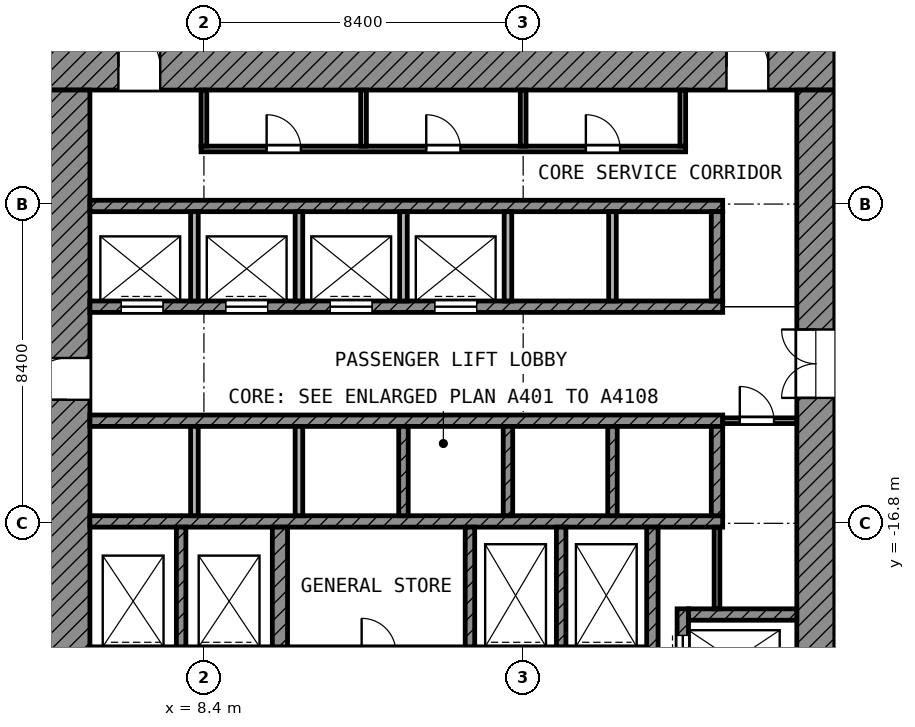
"""IFC4 building model, lengths in metres.
Left out: names, types, materials, properties, quantities, classifications, styles, units other than length and angle.
Written with IfcOpenShell. Run it as: python <this file> out.ifc"""

import sys

from ifc_helpers import new_model, si_unit, direction, frame, frame_2d, origin, place, context, subcontext, project, spatial, rectangle, extrude, element, fill, save


model = new_model("IFC4")
c1 = context("Model", 3, precision=1e-05, world=origin(), true_north=direction((0.0, 1.0)))
c2 = subcontext(c1, "Body", "Model", "MODEL_VIEW")
j1 = project(units=[si_unit("LENGTHUNIT", "METRE"), si_unit("PLANEANGLEUNIT", "RADIAN")], contexts=[c1])
p1 = place(None, origin())
s1 = spatial("IfcSite", under=j1, at=p1, CompositionType="ELEMENT")
p2 = place(p1, origin())
s2 = spatial("IfcBuilding", under=s1, at=p2, CompositionType="ELEMENT")
p3 = place(p2, frame((0.0, 0.0, 124.0)))
s3 = spatial("IfcBuildingStorey", under=s2, at=p3, CompositionType="ELEMENT", Elevation=124.0)
p4 = place(p3, frame((4.2, -4.8, 0.0), z_axis=(0.0, 0.0, 1.0), x_axis=(1.0, 0.0, 0.0)))
e1 = element("IfcWall", 1, at=p4, inside=s3, PredefinedType="SHEAR", context=c2, shape_type="SweptSolid", body=[
    extrude(rectangle(XDim=20.8, YDim=1.2, at=frame_2d((10.4, 0.0))), origin(), (0.0, 0.0, 1.0), 3.6),
])
p5 = place(p4, frame((1.95, 0.0, 0.0)))
e2 = element("IfcOpeningElement", 2, at=p5, cuts=e1, PredefinedType="OPENING", context=c2, shape_type="SweptSolid", body=[
    extrude(rectangle(XDim=1.1, YDim=2.1, at=frame_2d((0.55, 1.05))), frame((0.0, 0.61, 0.0), z_axis=(0.0, -1.0, 0.0), x_axis=(1.0, 0.0, 0.0)), (0.0, 0.0, 1.0), 1.22),
])
p6 = place(p4, frame((17.95, 0.0, 0.0)))
e3 = element("IfcOpeningElement", 3, at=p6, cuts=e1, PredefinedType="OPENING", context=c2, shape_type="SweptSolid", body=[
    extrude(rectangle(XDim=1.1, YDim=2.1, at=frame_2d((0.55, 1.05))), frame((0.0, 0.61, 0.0), z_axis=(0.0, -1.0, 0.0), x_axis=(1.0, 0.0, 0.0)), (0.0, 0.0, 1.0), 1.22),
])
p7 = place(p3, frame((4.8, -25.0, 0.0), z_axis=(0.0, 0.0, 1.0), x_axis=(0.0, 1.0, 0.0)))
e4 = element("IfcWall", 4, at=p7, inside=s3, PredefinedType="SHEAR", context=c2, shape_type="SweptSolid", body=[
    extrude(rectangle(XDim=19.6, YDim=1.2, at=frame_2d((9.8, 0.0))), origin(), (0.0, 0.0, 1.0), 3.6),
])
p8 = place(p7, frame((11.45, 0.0, 0.0)))
e5 = element("IfcOpeningElement", 5, at=p8, cuts=e4, PredefinedType="OPENING", context=c2, shape_type="SweptSolid", body=[
    extrude(rectangle(XDim=1.1, YDim=2.1, at=frame_2d((0.55, 1.05))), frame((0.0, 0.61, 0.0), z_axis=(0.0, -1.0, 0.0), x_axis=(1.0, 0.0, 0.0)), (0.0, 0.0, 1.0), 1.22),
])
p9 = place(p7, frame((2.15, 0.0, 0.0)))
e6 = element("IfcOpeningElement", 6, at=p9, cuts=e4, PredefinedType="OPENING", context=c2, shape_type="SweptSolid", body=[
    extrude(rectangle(XDim=1.1, YDim=2.1, at=frame_2d((0.55, 1.05))), frame((0.0, 0.61, 0.0), z_axis=(0.0, -1.0, 0.0), x_axis=(1.0, 0.0, 0.0)), (0.0, 0.0, 1.0), 1.22),
])
p10 = place(p3, frame((24.5, -24.0, 0.0), z_axis=(0.0, 0.0, 1.0), x_axis=(0.0, 1.0, 0.0)))
e7 = element("IfcWall", 7, at=p10, inside=s3, PredefinedType="SHEAR", context=c2, shape_type="SweptSolid", body=[
    extrude(rectangle(XDim=18.6, YDim=1.0, at=frame_2d((9.3, 0.0))), origin(), (0.0, 0.0, 1.0), 3.6),
])
p11 = place(p10, frame((10.5, 0.0, 0.0)))
e8 = element("IfcOpeningElement", 8, at=p11, cuts=e7, PredefinedType="OPENING", context=c2, shape_type="SweptSolid", body=[
    extrude(rectangle(XDim=1.8, YDim=2.1, at=frame_2d((0.9, 1.05))), frame((0.0, 0.51, 0.0), z_axis=(0.0, -1.0, 0.0), x_axis=(1.0, 0.0, 0.0)), (0.0, 0.0, 1.0), 1.02),
])
p12 = place(p3, frame((5.4, -8.45, 0.0), z_axis=(0.0, 0.0, 1.0), x_axis=(1.0, 0.0, 0.0)))
e9 = element("IfcWall", 9, at=p12, inside=s3, PredefinedType="SHEAR", context=c2, shape_type="SweptSolid", body=[
    extrude(rectangle(XDim=16.65, YDim=0.3, at=frame_2d((8.325, 0.0))), origin(), (0.0, 0.0, 1.0), 3.6),
])
p13 = place(p3, frame((5.4, -11.1, 0.0), z_axis=(0.0, 0.0, 1.0), x_axis=(1.0, 0.0, 0.0)))
e10 = element("IfcWall", 10, at=p13, inside=s3, PredefinedType="SHEAR", context=c2, shape_type="SweptSolid", body=[
    extrude(rectangle(XDim=16.65, YDim=0.3, at=frame_2d((8.325, 0.0))), origin(), (0.0, 0.0, 1.0), 3.6),
])
p14 = place(p13, frame((0.825, 0.0, 0.0)))
e11 = element("IfcOpeningElement", 11, at=p14, cuts=e10, PredefinedType="OPENING", context=c2, shape_type="SweptSolid", body=[
    extrude(rectangle(XDim=1.1, YDim=2.1, at=frame_2d((0.55, 1.05))), frame((0.0, 0.16, 0.0), z_axis=(0.0, -1.0, 0.0), x_axis=(1.0, 0.0, 0.0)), (0.0, 0.0, 1.0), 0.32),
])
p15 = place(p13, frame((3.575, 0.0, 0.0)))
e12 = element("IfcOpeningElement", 12, at=p15, cuts=e10, PredefinedType="OPENING", context=c2, shape_type="SweptSolid", body=[
    extrude(rectangle(XDim=1.1, YDim=2.1, at=frame_2d((0.55, 1.05))), frame((0.0, 0.16, 0.0), z_axis=(0.0, -1.0, 0.0), x_axis=(1.0, 0.0, 0.0)), (0.0, 0.0, 1.0), 0.32),
])
p16 = place(p13, frame((6.325, 0.0, 0.0)))
e13 = element("IfcOpeningElement", 13, at=p16, cuts=e10, PredefinedType="OPENING", context=c2, shape_type="SweptSolid", body=[
    extrude(rectangle(XDim=1.1, YDim=2.1, at=frame_2d((0.55, 1.05))), frame((0.0, 0.16, 0.0), z_axis=(0.0, -1.0, 0.0), x_axis=(1.0, 0.0, 0.0)), (0.0, 0.0, 1.0), 0.32),
])
p17 = place(p13, frame((9.075, 0.0, 0.0)))
e14 = element("IfcOpeningElement", 14, at=p17, cuts=e10, PredefinedType="OPENING", context=c2, shape_type="SweptSolid", body=[
    extrude(rectangle(XDim=1.1, YDim=2.1, at=frame_2d((0.55, 1.05))), frame((0.0, 0.16, 0.0), z_axis=(0.0, -1.0, 0.0), x_axis=(1.0, 0.0, 0.0)), (0.0, 0.0, 1.0), 0.32),
])
for number, where, z_axis, x_axis in (
    (15, (5.4, -14.1, 0.0), (0.0, 0.0, 1.0), (1.0, 0.0, 0.0)),
    (16, (5.4, -16.75, 0.0), (0.0, 0.0, 1.0), (1.0, 0.0, 0.0)),
):
    element("IfcWall", number, at=place(p3, frame(where, z_axis=z_axis, x_axis=x_axis)), inside=s3, PredefinedType="SHEAR", context=c2, shape_type="SweptSolid", body=[
        extrude(rectangle(XDim=16.65, YDim=0.3, at=frame_2d((8.325, 0.0))), origin(), (0.0, 0.0, 1.0), 3.6),
    ])
p18 = place(p3, frame((5.4, -20.2, 0.0), z_axis=(0.0, 0.0, 1.0), x_axis=(1.0, 0.0, 0.0)))
e17 = element("IfcWall", 17, at=p18, inside=s3, PredefinedType="SHEAR", context=c2, shape_type="SweptSolid", body=[
    extrude(rectangle(XDim=14.65, YDim=0.3, at=frame_2d((7.325, 0.0))), origin(), (0.0, 0.0, 1.0), 3.6),
])
p19 = place(p18, frame((10.55, 0.0, 0.0)))
e18 = element("IfcOpeningElement", 18, at=p19, cuts=e17, PredefinedType="OPENING", context=c2, shape_type="SweptSolid", body=[
    extrude(rectangle(XDim=1.3, YDim=2.1, at=frame_2d((0.65, 1.05))), frame((0.0, 0.16, 0.0), z_axis=(0.0, -1.0, 0.0), x_axis=(1.0, 0.0, 0.0)), (0.0, 0.0, 1.0), 0.32),
])
p20 = place(p18, frame((12.95, 0.0, 0.0)))
e19 = element("IfcOpeningElement", 19, at=p20, cuts=e17, PredefinedType="OPENING", context=c2, shape_type="SweptSolid", body=[
    extrude(rectangle(XDim=1.3, YDim=2.1, at=frame_2d((0.65, 1.05))), frame((0.0, 0.16, 0.0), z_axis=(0.0, -1.0, 0.0), x_axis=(1.0, 0.0, 0.0)), (0.0, 0.0, 1.0), 0.32),
])
p21 = place(p18, frame((0.55, 0.0, 0.0)))
e20 = element("IfcOpeningElement", 20, at=p21, cuts=e17, PredefinedType="OPENING", context=c2, shape_type="SweptSolid", body=[
    extrude(rectangle(XDim=1.3, YDim=2.1, at=frame_2d((0.65, 1.05))), frame((0.0, 0.16, 0.0), z_axis=(0.0, -1.0, 0.0), x_axis=(1.0, 0.0, 0.0)), (0.0, 0.0, 1.0), 0.32),
])
p22 = place(p18, frame((2.95, 0.0, 0.0)))
e21 = element("IfcOpeningElement", 21, at=p22, cuts=e17, PredefinedType="OPENING", context=c2, shape_type="SweptSolid", body=[
    extrude(rectangle(XDim=1.3, YDim=2.1, at=frame_2d((0.65, 1.05))), frame((0.0, 0.16, 0.0), z_axis=(0.0, -1.0, 0.0), x_axis=(1.0, 0.0, 0.0)), (0.0, 0.0, 1.0), 0.32),
])
p23 = place(p18, frame((7.15, 0.0, 0.0)))
e22 = element("IfcOpeningElement", 22, at=p23, cuts=e17, PredefinedType="OPENING", context=c2, shape_type="SweptSolid", body=[
    extrude(rectangle(XDim=0.9, YDim=2.1, at=frame_2d((0.45, 1.05))), frame((0.0, 0.16, 0.0), z_axis=(0.0, -1.0, 0.0), x_axis=(1.0, 0.0, 0.0)), (0.0, 0.0, 1.0), 0.32),
])
p24 = place(p3, frame((10.4, -20.05, 0.0), z_axis=(0.0, 0.0, 1.0), x_axis=(0.0, 1.0, 0.0)))
e23 = element("IfcWall", 23, at=p24, inside=s3, PredefinedType="SHEAR", context=c2, shape_type="SweptSolid", body=[
    extrude(rectangle(XDim=3.15, YDim=0.4, at=frame_2d((1.575, 0.0))), origin(), (0.0, 0.0, 1.0), 3.6),
])
p25 = place(p3, frame((20.2, -20.35, 0.0), z_axis=(0.0, 0.0, 1.0), x_axis=(0.0, 1.0, 0.0)))
e24 = element("IfcWall", 24, at=p25, inside=s3, PredefinedType="SHEAR", context=c2, shape_type="SweptSolid", body=[
    extrude(rectangle(XDim=3.45, YDim=0.3, at=frame_2d((1.725, 0.0))), origin(), (0.0, 0.0, 1.0), 3.6),
])
p26 = place(p3, frame((21.9, -10.95, 0.0), z_axis=(0.0, 0.0, 1.0), x_axis=(0.0, 1.0, 0.0)))
e25 = element("IfcWall", 25, at=p26, inside=s3, PredefinedType="SHEAR", context=c2, shape_type="SweptSolid", body=[
    extrude(rectangle(XDim=2.35, YDim=0.3, at=frame_2d((1.175, 0.0))), origin(), (0.0, 0.0, 1.0), 3.6),
])
p27 = place(p3, frame((21.9, -16.6, 0.0), z_axis=(0.0, 0.0, 1.0), x_axis=(0.0, 1.0, 0.0)))
e26 = element("IfcWall", 26, at=p27, inside=s3, PredefinedType="SHEAR", context=c2, shape_type="SweptSolid", body=[
    extrude(rectangle(XDim=2.35, YDim=0.3, at=frame_2d((1.175, 0.0))), origin(), (0.0, 0.0, 1.0), 3.6),
])
p28 = place(p3, frame((21.15, -19.2, 0.0), z_axis=(0.0, 0.0, 1.0), x_axis=(1.0, 0.0, 0.0)))
e27 = element("IfcWall", 27, at=p28, inside=s3, PredefinedType="SHEAR", context=c2, shape_type="SweptSolid", body=[
    extrude(rectangle(XDim=2.85, YDim=0.3, at=frame_2d((1.425, 0.0))), origin(), (0.0, 0.0, 1.0), 3.6),
])
p29 = place(p3, frame((21.0, -24.0, 0.0), z_axis=(0.0, 0.0, 1.0), x_axis=(0.0, 1.0, 0.0)))
e28 = element("IfcWall", 28, at=p29, inside=s3, PredefinedType="SHEAR", context=c2, shape_type="SweptSolid", body=[
    extrude(rectangle(XDim=4.95, YDim=0.3, at=frame_2d((2.475, 0.0))), origin(), (0.0, 0.0, 1.0), 3.6),
])
p30 = place(p29, frame((2.95, 0.0, 0.0)))
e29 = element("IfcOpeningElement", 29, at=p30, cuts=e28, PredefinedType="OPENING", context=c2, shape_type="SweptSolid", body=[
    extrude(rectangle(XDim=1.3, YDim=2.1, at=frame_2d((0.65, 1.05))), frame((0.0, 0.16, 0.0), z_axis=(0.0, -1.0, 0.0), x_axis=(1.0, 0.0, 0.0)), (0.0, 0.0, 1.0), 0.32),
])
p31 = place(p29, frame((0.55, 0.0, 0.0)))
e30 = element("IfcOpeningElement", 30, at=p31, cuts=e28, PredefinedType="OPENING", context=c2, shape_type="SweptSolid", body=[
    extrude(rectangle(XDim=1.3, YDim=2.1, at=frame_2d((0.65, 1.05))), frame((0.0, 0.16, 0.0), z_axis=(0.0, -1.0, 0.0), x_axis=(1.0, 0.0, 0.0)), (0.0, 0.0, 1.0), 0.32),
])
for number, where, z_axis, x_axis in (
    (31, (7.8, -20.05, 0.0), (0.0, 0.0, 1.0), (0.0, 1.0, 0.0)),
    (32, (15.4, -20.05, 0.0), (0.0, 0.0, 1.0), (0.0, 1.0, 0.0)),
    (33, (17.8, -20.05, 0.0), (0.0, 0.0, 1.0), (0.0, 1.0, 0.0)),
):
    element("IfcWall", number, at=place(p3, frame(where, z_axis=z_axis, x_axis=x_axis)), inside=s3, PredefinedType="SHEAR", context=c2, shape_type="SweptSolid", body=[
        extrude(rectangle(XDim=3.15, YDim=0.25, at=frame_2d((1.575, 0.0))), origin(), (0.0, 0.0, 1.0), 3.6),
    ])
for number, where, z_axis, x_axis in (
    (34, (8.15, -10.95, 0.0), (0.0, 0.0, 1.0), (0.0, 1.0, 0.0)),
    (35, (10.9, -10.95, 0.0), (0.0, 0.0, 1.0), (0.0, 1.0, 0.0)),
    (36, (13.65, -10.95, 0.0), (0.0, 0.0, 1.0), (0.0, 1.0, 0.0)),
    (37, (16.4, -10.95, 0.0), (0.0, 0.0, 1.0), (0.0, 1.0, 0.0)),
    (38, (19.15, -10.95, 0.0), (0.0, 0.0, 1.0), (0.0, 1.0, 0.0)),
):
    element("IfcWall", number, at=place(p3, frame(where, z_axis=z_axis, x_axis=x_axis)), inside=s3, PredefinedType="PARTITIONING", context=c2, shape_type="SweptSolid", body=[
        extrude(rectangle(XDim=2.35, YDim=0.2, at=frame_2d((1.175, 0.0))), origin(), (0.0, 0.0, 1.0), 3.6),
    ])
for number, where, z_axis, x_axis in (
    (39, (8.15, -16.6, 0.0), (0.0, 0.0, 1.0), (0.0, 1.0, 0.0)),
    (40, (10.9, -16.6, 0.0), (0.0, 0.0, 1.0), (0.0, 1.0, 0.0)),
):
    element("IfcWall", number, at=place(p3, frame(where, z_axis=z_axis, x_axis=x_axis)), inside=s3, PredefinedType="PARTITIONING", context=c2, shape_type="SweptSolid", body=[
        extrude(rectangle(XDim=2.35, YDim=0.2, at=frame_2d((1.175, 0.0))), origin(), (0.0, 0.0, 1.0), 3.6),
    ])
for number, where, z_axis, x_axis in (
    (41, (13.65, -16.6, 0.0), (0.0, 0.0, 1.0), (0.0, 1.0, 0.0)),
    (42, (16.4, -16.6, 0.0), (0.0, 0.0, 1.0), (0.0, 1.0, 0.0)),
    (43, (19.15, -16.6, 0.0), (0.0, 0.0, 1.0), (0.0, 1.0, 0.0)),
):
    element("IfcWall", number, at=place(p3, frame(where, z_axis=z_axis, x_axis=x_axis)), inside=s3, PredefinedType="SHEAR", context=c2, shape_type="SweptSolid", body=[
        extrude(rectangle(XDim=2.35, YDim=0.25, at=frame_2d((1.175, 0.0))), origin(), (0.0, 0.0, 1.0), 3.6),
    ])
p32 = place(p3, frame((21.9, -19.05, 0.0), z_axis=(0.0, 0.0, 1.0), x_axis=(0.0, 1.0, 0.0)))
e44 = element("IfcWall", 44, at=p32, inside=s3, PredefinedType="PARTITIONING", context=c2, shape_type="SweptSolid", body=[
    extrude(rectangle(XDim=2.15, YDim=0.15, at=frame_2d((1.075, 0.0))), origin(), (0.0, 0.0, 1.0), 3.6),
])
p33 = place(p3, frame((22.05, -14.1, 0.0), z_axis=(0.0, 0.0, 1.0), x_axis=(1.0, 0.0, 0.0)))
e45 = element("IfcWall", 45, at=p33, inside=s3, PredefinedType="PARTITIONING", context=c2, shape_type="SweptSolid", body=[
    extrude(rectangle(XDim=1.95, YDim=0.15, at=frame_2d((0.975, 0.0))), origin(), (0.0, 0.0, 1.0), 3.6),
])
p34 = place(p33, frame((0.45, 0.0, 0.0)))
e46 = element("IfcOpeningElement", 46, at=p34, cuts=e45, PredefinedType="OPENING", context=c2, shape_type="SweptSolid", body=[
    extrude(rectangle(XDim=0.9, YDim=2.1, at=frame_2d((0.45, 1.05))), frame((0.0, 0.085, 0.0), z_axis=(0.0, -1.0, 0.0), x_axis=(1.0, 0.0, 0.0)), (0.0, 0.0, 1.0), 0.17),
])
p35 = place(p3, frame((8.325, -6.95, 0.0), z_axis=(0.0, 0.0, 1.0), x_axis=(1.0, 0.0, 0.0)))
e47 = element("IfcWall", 47, at=p35, inside=s3, PredefinedType="PARTITIONING", context=c2, shape_type="SweptSolid", body=[
    extrude(rectangle(XDim=12.75, YDim=0.15, at=frame_2d((6.375, 0.0))), origin(), (0.0, 0.0, 1.0), 3.6),
])
p36 = place(p35, frame((1.725, 0.0, 0.0)))
e48 = element("IfcOpeningElement", 48, at=p36, cuts=e47, PredefinedType="OPENING", context=c2, shape_type="SweptSolid", body=[
    extrude(rectangle(XDim=0.9, YDim=2.1, at=frame_2d((0.45, 1.05))), frame((0.0, 0.085, 0.0), z_axis=(0.0, -1.0, 0.0), x_axis=(1.0, 0.0, 0.0)), (0.0, 0.0, 1.0), 0.17),
])
p37 = place(p35, frame((5.925, 0.0, 0.0)))
e49 = element("IfcOpeningElement", 49, at=p37, cuts=e47, PredefinedType="OPENING", context=c2, shape_type="SweptSolid", body=[
    extrude(rectangle(XDim=0.9, YDim=2.1, at=frame_2d((0.45, 1.05))), frame((0.0, 0.085, 0.0), z_axis=(0.0, -1.0, 0.0), x_axis=(1.0, 0.0, 0.0)), (0.0, 0.0, 1.0), 0.17),
])
p38 = place(p35, frame((10.125, 0.0, 0.0)))
e50 = element("IfcOpeningElement", 50, at=p38, cuts=e47, PredefinedType="OPENING", context=c2, shape_type="SweptSolid", body=[
    extrude(rectangle(XDim=0.9, YDim=2.1, at=frame_2d((0.45, 1.05))), frame((0.0, 0.085, 0.0), z_axis=(0.0, -1.0, 0.0), x_axis=(1.0, 0.0, 0.0)), (0.0, 0.0, 1.0), 0.17),
])
for number, where, z_axis, x_axis in (
    (51, (8.4, -6.875, 0.0), (0.0, 0.0, 1.0), (0.0, 1.0, 0.0)),
    (52, (12.6, -6.875, 0.0), (0.0, 0.0, 1.0), (0.0, 1.0, 0.0)),
    (53, (16.8, -6.875, 0.0), (0.0, 0.0, 1.0), (0.0, 1.0, 0.0)),
    (54, (21.0, -6.875, 0.0), (0.0, 0.0, 1.0), (0.0, 1.0, 0.0)),
):
    element("IfcWall", number, at=place(p3, frame(where, z_axis=z_axis, x_axis=x_axis)), inside=s3, PredefinedType="PARTITIONING", context=c2, shape_type="SweptSolid", body=[
        extrude(rectangle(XDim=1.475, YDim=0.15, at=frame_2d((0.738, 0.0))), origin(), (0.0, 0.0, 1.0), 3.6),
    ])
p39 = place(p14, origin())
e55 = element("IfcDoor", 55, at=p39, inside=s3, OperationType="DOUBLE_DOOR_SLIDING", PredefinedType="DOOR", context=c2, shape_type="SweptSolid", body=[
    extrude(rectangle(XDim=1.1, YDim=2.1, at=frame_2d((0.55, 1.05))), frame((0.0, 0.025, 0.0), z_axis=(0.0, -1.0, 0.0), x_axis=(1.0, 0.0, 0.0)), (0.0, 0.0, 1.0), 0.05),
])
fill(e11, e55)
p40 = place(p15, origin())
e56 = element("IfcDoor", 56, at=p40, inside=s3, OperationType="DOUBLE_DOOR_SLIDING", PredefinedType="DOOR", context=c2, shape_type="SweptSolid", body=[
    extrude(rectangle(XDim=1.1, YDim=2.1, at=frame_2d((0.55, 1.05))), frame((0.0, 0.025, 0.0), z_axis=(0.0, -1.0, 0.0), x_axis=(1.0, 0.0, 0.0)), (0.0, 0.0, 1.0), 0.05),
])
fill(e12, e56)
p41 = place(p16, origin())
e57 = element("IfcDoor", 57, at=p41, inside=s3, OperationType="DOUBLE_DOOR_SLIDING", PredefinedType="DOOR", context=c2, shape_type="SweptSolid", body=[
    extrude(rectangle(XDim=1.1, YDim=2.1, at=frame_2d((0.55, 1.05))), frame((0.0, 0.025, 0.0), z_axis=(0.0, -1.0, 0.0), x_axis=(1.0, 0.0, 0.0)), (0.0, 0.0, 1.0), 0.05),
])
fill(e13, e57)
p42 = place(p17, origin())
e58 = element("IfcDoor", 58, at=p42, inside=s3, OperationType="DOUBLE_DOOR_SLIDING", PredefinedType="DOOR", context=c2, shape_type="SweptSolid", body=[
    extrude(rectangle(XDim=1.1, YDim=2.1, at=frame_2d((0.55, 1.05))), frame((0.0, 0.025, 0.0), z_axis=(0.0, -1.0, 0.0), x_axis=(1.0, 0.0, 0.0)), (0.0, 0.0, 1.0), 0.05),
])
fill(e14, e58)
p43 = place(p30, origin())
e59 = element("IfcDoor", 59, at=p43, inside=s3, OperationType="DOUBLE_DOOR_SLIDING", PredefinedType="DOOR", context=c2, shape_type="SweptSolid", body=[
    extrude(rectangle(XDim=1.3, YDim=2.1, at=frame_2d((0.65, 1.05))), frame((0.0, 0.025, 0.0), z_axis=(0.0, -1.0, 0.0), x_axis=(1.0, 0.0, 0.0)), (0.0, 0.0, 1.0), 0.05),
])
fill(e29, e59)
p44 = place(p8, origin())
e60 = element("IfcDoor", 60, at=p44, inside=s3, OperationType="SINGLE_SWING_LEFT", PredefinedType="DOOR", context=c2, shape_type="SweptSolid", body=[
    extrude(rectangle(XDim=1.1, YDim=2.1, at=frame_2d((0.55, 1.05))), frame((0.0, 0.025, 0.0), z_axis=(0.0, -1.0, 0.0), x_axis=(1.0, 0.0, 0.0)), (0.0, 0.0, 1.0), 0.05),
])
fill(e5, e60)
p45 = place(p5, origin())
e61 = element("IfcDoor", 61, at=p45, inside=s3, OperationType="SINGLE_SWING_LEFT", PredefinedType="DOOR", context=c2, shape_type="SweptSolid", body=[
    extrude(rectangle(XDim=1.1, YDim=2.1, at=frame_2d((0.55, 1.05))), frame((0.0, 0.025, 0.0), z_axis=(0.0, -1.0, 0.0), x_axis=(1.0, 0.0, 0.0)), (0.0, 0.0, 1.0), 0.05),
])
fill(e2, e61)
p46 = place(p6, origin())
e62 = element("IfcDoor", 62, at=p46, inside=s3, OperationType="SINGLE_SWING_LEFT", PredefinedType="DOOR", context=c2, shape_type="SweptSolid", body=[
    extrude(rectangle(XDim=1.1, YDim=2.1, at=frame_2d((0.55, 1.05))), frame((0.0, 0.025, 0.0), z_axis=(0.0, -1.0, 0.0), x_axis=(1.0, 0.0, 0.0)), (0.0, 0.0, 1.0), 0.05),
])
fill(e3, e62)
p47 = place(p11, origin())
e63 = element("IfcDoor", 63, at=p47, inside=s3, OperationType="DOUBLE_DOOR_SINGLE_SWING", PredefinedType="DOOR", context=c2, shape_type="SweptSolid", body=[
    extrude(rectangle(XDim=1.8, YDim=2.1, at=frame_2d((0.9, 1.05))), frame((0.0, 0.025, 0.0), z_axis=(0.0, -1.0, 0.0), x_axis=(1.0, 0.0, 0.0)), (0.0, 0.0, 1.0), 0.05),
])
fill(e8, e63)
p48 = place(p36, origin())
e64 = element("IfcDoor", 64, at=p48, inside=s3, OperationType="SINGLE_SWING_LEFT", PredefinedType="DOOR", context=c2, shape_type="SweptSolid", body=[
    extrude(rectangle(XDim=0.9, YDim=2.1, at=frame_2d((0.45, 1.05))), frame((0.0, 0.025, 0.0), z_axis=(0.0, -1.0, 0.0), x_axis=(1.0, 0.0, 0.0)), (0.0, 0.0, 1.0), 0.05),
])
fill(e48, e64)
p49 = place(p37, origin())
e65 = element("IfcDoor", 65, at=p49, inside=s3, OperationType="SINGLE_SWING_LEFT", PredefinedType="DOOR", context=c2, shape_type="SweptSolid", body=[
    extrude(rectangle(XDim=0.9, YDim=2.1, at=frame_2d((0.45, 1.05))), frame((0.0, 0.025, 0.0), z_axis=(0.0, -1.0, 0.0), x_axis=(1.0, 0.0, 0.0)), (0.0, 0.0, 1.0), 0.05),
])
fill(e49, e65)
p50 = place(p38, origin())
e66 = element("IfcDoor", 66, at=p50, inside=s3, OperationType="SINGLE_SWING_LEFT", PredefinedType="DOOR", context=c2, shape_type="SweptSolid", body=[
    extrude(rectangle(XDim=0.9, YDim=2.1, at=frame_2d((0.45, 1.05))), frame((0.0, 0.025, 0.0), z_axis=(0.0, -1.0, 0.0), x_axis=(1.0, 0.0, 0.0)), (0.0, 0.0, 1.0), 0.05),
])
fill(e50, e66)
p51 = place(p34, origin())
e67 = element("IfcDoor", 67, at=p51, inside=s3, OperationType="SINGLE_SWING_LEFT", PredefinedType="DOOR", context=c2, shape_type="SweptSolid", body=[
    extrude(rectangle(XDim=0.9, YDim=2.1, at=frame_2d((0.45, 1.05))), frame((0.0, 0.025, 0.0), z_axis=(0.0, -1.0, 0.0), x_axis=(1.0, 0.0, 0.0)), (0.0, 0.0, 1.0), 0.05),
])
fill(e46, e67)
save(model, sys.argv[1])
